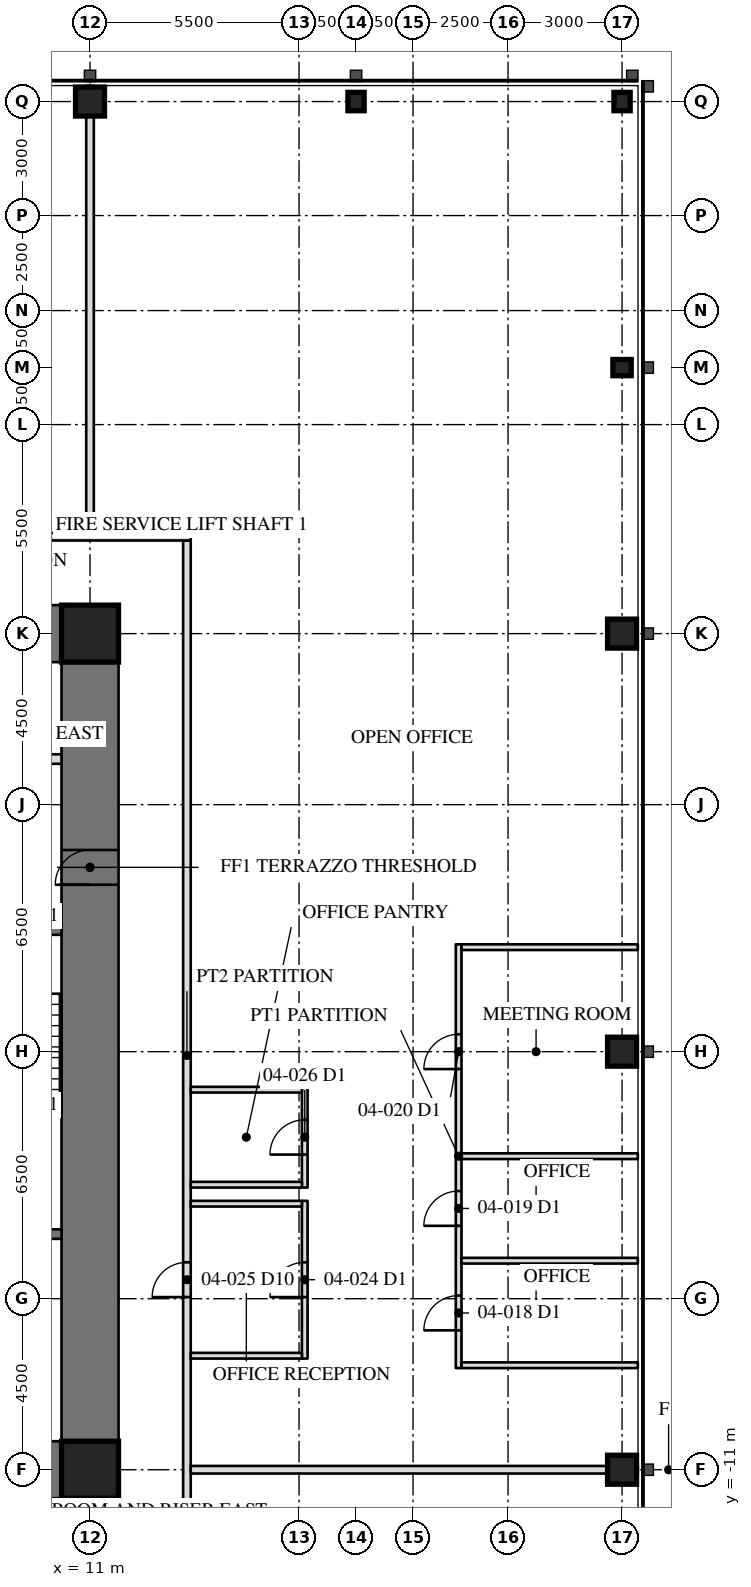
"""IFC4 building model, lengths in metres.
Left out: names, types, materials, properties, quantities, classifications, styles, units other than length and angle.
Written with IfcOpenShell. Run it as: python <this file> out.ifc"""

import sys

from ifc_helpers import new_model, si_unit, direction, frame, frame_2d, origin, origin_2d, place, context, subcontext, project, spatial, rectangle, hollow_rectangle, i_section, extrude, element, fill, save


model = new_model("IFC4")
c1 = context("Model", 3, precision=1e-05, world=origin(), true_north=direction((0.0, 1.0)))
c2 = subcontext(c1, "Body", "Model", "MODEL_VIEW")
j1 = project(units=[si_unit("LENGTHUNIT", "METRE"), si_unit("PLANEANGLEUNIT", "RADIAN")], contexts=[c1])
p1 = place(None, origin())
s1 = spatial("IfcSite", under=j1, at=p1, CompositionType="ELEMENT")
p2 = place(p1, origin())
s2 = spatial("IfcBuilding", under=s1, at=p2, CompositionType="ELEMENT")
p3 = place(p2, frame((0.0, 0.0, 20.1)))
s3 = spatial("IfcBuildingStorey", under=s2, at=p3, CompositionType="ELEMENT", Elevation=20.1)
for number, where, z_axis, x_axis in (
    (1, (25.0, -11.0, 0.0), (0.0, 0.0, 1.0), (0.0, 1.0, 0.0)),
    (2, (25.0, 0.0, 0.0), (0.0, 0.0, 1.0), (0.0, 1.0, 0.0)),
    (3, (25.0, 11.0, 0.0), (0.0, 0.0, 1.0), (0.0, 1.0, 0.0)),
):
    element("IfcColumn", number, at=place(p3, frame(where, z_axis=z_axis, x_axis=x_axis)), inside=s3, PredefinedType="COLUMN", context=c2, shape_type="SweptSolid", body=[
        extrude(hollow_rectangle(XDim=0.762, YDim=0.762, WallThickness=0.152, at=origin_2d()), origin(), (0.0, 0.0, 1.0), 4.1),
    ])
for number, where, z_axis, x_axis in (
    (4, (25.0, 18.0, 0.0), (0.0, 0.0, 1.0), (0.0, 1.0, 0.0)),
    (5, (25.0, 25.0, 0.0), (0.0, 0.0, 1.0), (1.0, 0.0, 0.0)),
    (6, (18.0, 25.0, 0.0), (0.0, 0.0, 1.0), (1.0, 0.0, 0.0)),
):
    element("IfcColumn", number, at=place(p3, frame(where, z_axis=z_axis, x_axis=x_axis)), inside=s3, PredefinedType="COLUMN", context=c2, shape_type="SweptSolid", body=[
        extrude(i_section(OverallWidth=0.427, OverallDepth=0.483, WebThickness=0.051, FlangeThickness=0.082, at=origin_2d()), origin(), (0.0, 0.0, 1.0), 4.1),
    ])
p4 = place(p3, frame((11.0, 25.0, 0.0), z_axis=(0.0, 0.0, 1.0), x_axis=(1.0, 0.0, 0.0)))
e7 = element("IfcColumn", 7, at=p4, inside=s3, PredefinedType="COLUMN", context=c2, shape_type="SweptSolid", body=[
    extrude(hollow_rectangle(XDim=0.762, YDim=0.762, WallThickness=0.152, at=origin_2d()), origin(), (0.0, 0.0, 1.0), 4.1),
])
p5 = place(p3, frame((11.0, -11.0, 0.0), z_axis=(0.0, 0.0, 1.0), x_axis=(0.0, 1.0, 0.0)))
e8 = element("IfcWall", 8, at=p5, inside=s3, PredefinedType="SHEAR", context=c2, shape_type="SweptSolid", body=[
    extrude(rectangle(XDim=22.0, YDim=1.5, at=frame_2d((11.0, 0.0))), origin(), (0.0, 0.0, 1.0), 4.1),
])
p6 = place(p5, frame((15.393, 0.0, 0.0)))
e9 = element("IfcOpeningElement", 9, at=p6, cuts=e8, PredefinedType="OPENING", context=c2, shape_type="SweptSolid", body=[
    extrude(rectangle(XDim=0.915, YDim=2.134, at=frame_2d((0.458, 1.067))), frame((0.0, 0.76, 0.0), z_axis=(0.0, -1.0, 0.0), x_axis=(1.0, 0.0, 0.0)), (0.0, 0.0, 1.0), 1.52),
])
for number, where, z_axis, x_axis in (
    (10, (11.0, 11.0, 0.0), (0.0, 0.0, 1.0), (-1.0, 0.0, 0.0)),
    (11, (6.5, -11.0, 0.0), (0.0, 0.0, 1.0), (1.0, 0.0, 0.0)),
):
    element("IfcWall", number, at=place(p3, frame(where, z_axis=z_axis, x_axis=x_axis)), inside=s3, PredefinedType="SHEAR", context=c2, shape_type="SweptSolid", body=[
        extrude(rectangle(XDim=4.5, YDim=1.5, at=frame_2d((2.25, 0.0))), origin(), (0.0, 0.0, 1.0), 4.1),
    ])
for number, where, z_axis, x_axis in (
    (12, (11.0, 11.0, 0.0), (0.0, 0.0, 1.0), (1.0, 0.0, 0.0)),
    (13, (11.0, -11.0, 0.0), (0.0, 0.0, 1.0), (1.0, 0.0, 0.0)),
):
    element("IfcColumn", number, at=place(p3, frame(where, z_axis=z_axis, x_axis=x_axis)), inside=s3, PredefinedType="COLUMN", context=c2, shape_type="SweptSolid", body=[
        extrude(hollow_rectangle(XDim=1.499, YDim=1.499, WallThickness=0.102, at=origin_2d()), origin(), (0.0, 0.0, 1.0), 4.1),
    ])
p7 = place(p3, frame((6.95, -4.8, 0.0), z_axis=(0.0, 0.0, 1.0), x_axis=(1.0, 0.0, 0.0)))
e14 = element("IfcWall", 14, at=p7, inside=s3, PredefinedType="SOLIDWALL", context=c2, shape_type="SweptSolid", body=[
    extrude(rectangle(XDim=3.3, YDim=0.25, at=frame_2d((1.65, 0.0))), origin(), (0.0, 0.0, 1.0), 3.91),
])
p8 = place(p3, frame((6.95, 3.2, 0.0), z_axis=(0.0, 0.0, 1.0), x_axis=(1.0, 0.0, 0.0)))
e15 = element("IfcWall", 15, at=p8, inside=s3, PredefinedType="SOLIDWALL", context=c2, shape_type="SweptSolid", body=[
    extrude(rectangle(XDim=3.3, YDim=0.25, at=frame_2d((1.65, 0.0))), origin(), (0.0, 0.0, 1.0), 3.91),
])
p9 = place(p8, frame((1.116, 0.0, 0.0)))
e16 = element("IfcOpeningElement", 16, at=p9, cuts=e15, PredefinedType="OPENING", context=c2, shape_type="SweptSolid", body=[
    extrude(rectangle(XDim=1.067, YDim=2.134, at=frame_2d((0.533, 1.067))), frame((0.0, 0.135, 0.0), z_axis=(0.0, -1.0, 0.0), x_axis=(1.0, 0.0, 0.0)), (0.0, 0.0, 1.0), 0.27),
])
p10 = place(p3, frame((6.95, 7.7, 0.0), z_axis=(0.0, 0.0, 1.0), x_axis=(1.0, 0.0, 0.0)))
e17 = element("IfcWall", 17, at=p10, inside=s3, PredefinedType="PARTITIONING", context=c2, shape_type="SweptSolid", body=[
    extrude(rectangle(XDim=3.3, YDim=0.25, at=frame_2d((1.65, 0.0))), origin(), (0.0, 0.0, 1.0), 3.91),
])
p11 = place(p10, frame((0.45, 0.0, 0.0)))
e18 = element("IfcOpeningElement", 18, at=p11, cuts=e17, PredefinedType="OPENING", context=c2, shape_type="SweptSolid", body=[
    extrude(rectangle(XDim=1.219, YDim=2.134, at=frame_2d((0.609, 1.067))), frame((0.0, 0.135, 0.0), z_axis=(0.0, -1.0, 0.0), x_axis=(1.0, 0.0, 0.0)), (0.0, 0.0, 1.0), 0.27),
])
p12 = place(p3, frame((13.55, -13.65, 0.0), z_axis=(0.0, 0.0, 1.0), x_axis=(0.0, 1.0, 0.0)))
e19 = element("IfcWall", 19, at=p12, inside=s3, PredefinedType="PARTITIONING", context=c2, shape_type="SweptSolid", body=[
    extrude(rectangle(XDim=27.1, YDim=0.2, at=frame_2d((13.55, 0.0))), origin(), (0.0, 0.0, 1.0), 3.91),
])
p13 = place(p12, frame((7.192, 0.0, 0.0)))
e20 = element("IfcOpeningElement", 20, at=p13, cuts=e19, PredefinedType="OPENING", context=c2, shape_type="SweptSolid", body=[
    extrude(rectangle(XDim=0.915, YDim=2.134, at=frame_2d((0.458, 1.067))), frame((0.0, 0.11, 0.0), z_axis=(0.0, -1.0, 0.0), x_axis=(1.0, 0.0, 0.0)), (0.0, 0.0, 1.0), 0.22),
])
p14 = place(p3, frame((13.65, 13.55, 0.0), z_axis=(0.0, 0.0, 1.0), x_axis=(-1.0, 0.0, 0.0)))
e21 = element("IfcWall", 21, at=p14, inside=s3, PredefinedType="PARTITIONING", context=c2, shape_type="SweptSolid", body=[
    extrude(rectangle(XDim=27.1, YDim=0.2, at=frame_2d((13.55, 0.0))), origin(), (0.0, 0.0, 1.0), 3.91),
])
p15 = place(p14, frame((9.192, 0.0, 0.0)))
e22 = element("IfcOpeningElement", 22, at=p15, cuts=e21, PredefinedType="OPENING", context=c2, shape_type="SweptSolid", body=[
    extrude(rectangle(XDim=0.915, YDim=2.134, at=frame_2d((0.458, 1.067))), frame((0.0, 0.11, 0.0), z_axis=(0.0, -1.0, 0.0), x_axis=(1.0, 0.0, 0.0)), (0.0, 0.0, 1.0), 0.22),
])
for number, where, z_axis, x_axis in (
    (23, (11.0, 13.65, 0.0), (0.0, 0.0, 1.0), (0.0, 1.0, 0.0)),
    (24, (13.65, -11.0, 0.0), (0.0, 0.0, 1.0), (1.0, 0.0, 0.0)),
):
    element("IfcWall", number, at=place(p3, frame(where, z_axis=z_axis, x_axis=x_axis)), inside=s3, PredefinedType="PARTITIONING", context=c2, shape_type="SweptSolid", body=[
        extrude(rectangle(XDim=11.765, YDim=0.2, at=frame_2d((5.883, 0.0))), origin(), (0.0, 0.0, 1.0), 3.13),
    ])
p16 = place(p3, frame((20.7, -8.325, 0.0), z_axis=(0.0, 0.0, 1.0), x_axis=(0.0, 1.0, 0.0)))
e25 = element("IfcWall", 25, at=p16, inside=s3, PredefinedType="PARTITIONING", context=c2, shape_type="SweptSolid", body=[
    extrude(rectangle(XDim=11.15, YDim=0.15, at=frame_2d((5.575, 0.0))), origin(), (0.0, 0.0, 1.0), 3.91),
])
p17 = place(p16, frame((0.992, 0.0, 0.0)))
e26 = element("IfcOpeningElement", 26, at=p17, cuts=e25, PredefinedType="OPENING", context=c2, shape_type="SweptSolid", body=[
    extrude(rectangle(XDim=0.915, YDim=2.134, at=frame_2d((0.458, 1.067))), frame((0.0, 0.085, 0.0), z_axis=(0.0, -1.0, 0.0), x_axis=(1.0, 0.0, 0.0)), (0.0, 0.0, 1.0), 0.17),
])
p18 = place(p16, frame((3.742, 0.0, 0.0)))
e27 = element("IfcOpeningElement", 27, at=p18, cuts=e25, PredefinedType="OPENING", context=c2, shape_type="SweptSolid", body=[
    extrude(rectangle(XDim=0.915, YDim=2.134, at=frame_2d((0.458, 1.067))), frame((0.0, 0.085, 0.0), z_axis=(0.0, -1.0, 0.0), x_axis=(1.0, 0.0, 0.0)), (0.0, 0.0, 1.0), 0.17),
])
p19 = place(p16, frame((7.867, 0.0, 0.0)))
e28 = element("IfcOpeningElement", 28, at=p19, cuts=e25, PredefinedType="OPENING", context=c2, shape_type="SweptSolid", body=[
    extrude(rectangle(XDim=0.915, YDim=2.134, at=frame_2d((0.458, 1.067))), frame((0.0, 0.085, 0.0), z_axis=(0.0, -1.0, 0.0), x_axis=(1.0, 0.0, 0.0)), (0.0, 0.0, 1.0), 0.17),
])
for number, where, z_axis, x_axis in (
    (29, (20.775, -8.25, 0.0), (0.0, 0.0, 1.0), (1.0, 0.0, 0.0)),
    (30, (20.775, -5.5, 0.0), (0.0, 0.0, 1.0), (1.0, 0.0, 0.0)),
    (31, (20.775, -2.75, 0.0), (0.0, 0.0, 1.0), (1.0, 0.0, 0.0)),
    (32, (20.775, 2.75, 0.0), (0.0, 0.0, 1.0), (1.0, 0.0, 0.0)),
):
    element("IfcWall", number, at=place(p3, frame(where, z_axis=z_axis, x_axis=x_axis)), inside=s3, PredefinedType="PARTITIONING", context=c2, shape_type="SweptSolid", body=[
        extrude(rectangle(XDim=4.64, YDim=0.15, at=frame_2d((2.32, 0.0))), origin(), (0.0, 0.0, 1.0), 3.91),
    ])
p20 = place(p3, frame((16.65, -8.075, 0.0), z_axis=(0.0, 0.0, 1.0), x_axis=(0.0, 1.0, 0.0)))
e33 = element("IfcWall", 33, at=p20, inside=s3, PredefinedType="PARTITIONING", context=c2, shape_type="SweptSolid", body=[
    extrude(rectangle(XDim=4.15, YDim=0.15, at=frame_2d((2.075, 0.0))), origin(), (0.0, 0.0, 1.0), 3.91),
])
p21 = place(p20, frame((1.617, 0.0, 0.0)))
e34 = element("IfcOpeningElement", 34, at=p21, cuts=e33, PredefinedType="OPENING", context=c2, shape_type="SweptSolid", body=[
    extrude(rectangle(XDim=0.915, YDim=2.134, at=frame_2d((0.458, 1.067))), frame((0.0, 0.085, 0.0), z_axis=(0.0, -1.0, 0.0), x_axis=(1.0, 0.0, 0.0)), (0.0, 0.0, 1.0), 0.17),
])
for number, where, z_axis, x_axis in (
    (35, (16.575, -8.0, 0.0), (0.0, 0.0, 1.0), (-1.0, 0.0, 0.0)),
    (36, (16.575, -4.0, 0.0), (0.0, 0.0, 1.0), (-1.0, 0.0, 0.0)),
):
    element("IfcWall", number, at=place(p3, frame(where, z_axis=z_axis, x_axis=x_axis)), inside=s3, PredefinedType="PARTITIONING", context=c2, shape_type="SweptSolid", body=[
        extrude(rectangle(XDim=2.925, YDim=0.15, at=frame_2d((1.462, 0.0))), origin(), (0.0, 0.0, 1.0), 3.91),
    ])
p22 = place(p3, frame((16.65, -3.575, 0.0), z_axis=(0.0, 0.0, 1.0), x_axis=(0.0, 1.0, 0.0)))
e37 = element("IfcWall", 37, at=p22, inside=s3, PredefinedType="PARTITIONING", context=c2, shape_type="SweptSolid", body=[
    extrude(rectangle(XDim=2.65, YDim=0.15, at=frame_2d((1.325, 0.0))), origin(), (0.0, 0.0, 1.0), 3.91),
])
p23 = place(p22, frame((0.867, 0.0, 0.0)))
e38 = element("IfcOpeningElement", 38, at=p23, cuts=e37, PredefinedType="OPENING", context=c2, shape_type="SweptSolid", body=[
    extrude(rectangle(XDim=0.915, YDim=2.134, at=frame_2d((0.458, 1.067))), frame((0.0, 0.085, 0.0), z_axis=(0.0, -1.0, 0.0), x_axis=(1.0, 0.0, 0.0)), (0.0, 0.0, 1.0), 0.17),
])
for number, where, z_axis, x_axis in (
    (39, (16.575, -3.5, 0.0), (0.0, 0.0, 1.0), (-1.0, 0.0, 0.0)),
    (40, (16.575, -1.0, 0.0), (0.0, 0.0, 1.0), (-1.0, 0.0, 0.0)),
):
    element("IfcWall", number, at=place(p3, frame(where, z_axis=z_axis, x_axis=x_axis)), inside=s3, PredefinedType="PARTITIONING", context=c2, shape_type="SweptSolid", body=[
        extrude(rectangle(XDim=2.925, YDim=0.15, at=frame_2d((1.462, 0.0))), origin(), (0.0, 0.0, 1.0), 3.91),
    ])
p24 = place(p6, origin())
e41 = element("IfcDoor", 41, at=p24, inside=s3, OperationType="SINGLE_SWING_RIGHT", PredefinedType="DOOR", context=c2, shape_type="SweptSolid", body=[
    extrude(rectangle(XDim=0.915, YDim=2.134, at=frame_2d((0.458, 1.067))), frame((0.0, -0.675, 0.0), z_axis=(0.0, -1.0, 0.0), x_axis=(1.0, 0.0, 0.0)), (0.0, 0.0, 1.0), 0.05),
])
fill(e9, e41)
p25 = place(p17, origin())
e42 = element("IfcDoor", 42, at=p25, inside=s3, OperationType="SINGLE_SWING_LEFT", PredefinedType="DOOR", context=c2, shape_type="SweptSolid", body=[
    extrude(rectangle(XDim=0.915, YDim=2.134, at=frame_2d((0.458, 1.067))), frame((0.0, 0.025, 0.0), z_axis=(0.0, -1.0, 0.0), x_axis=(1.0, 0.0, 0.0)), (0.0, 0.0, 1.0), 0.05),
])
fill(e26, e42)
p26 = place(p18, origin())
e43 = element("IfcDoor", 43, at=p26, inside=s3, OperationType="SINGLE_SWING_LEFT", PredefinedType="DOOR", context=c2, shape_type="SweptSolid", body=[
    extrude(rectangle(XDim=0.915, YDim=2.134, at=frame_2d((0.458, 1.067))), frame((0.0, 0.025, 0.0), z_axis=(0.0, -1.0, 0.0), x_axis=(1.0, 0.0, 0.0)), (0.0, 0.0, 1.0), 0.05),
])
fill(e27, e43)
p27 = place(p19, origin())
e44 = element("IfcDoor", 44, at=p27, inside=s3, OperationType="SINGLE_SWING_LEFT", PredefinedType="DOOR", context=c2, shape_type="SweptSolid", body=[
    extrude(rectangle(XDim=0.915, YDim=2.134, at=frame_2d((0.458, 1.067))), frame((0.0, 0.025, 0.0), z_axis=(0.0, -1.0, 0.0), x_axis=(1.0, 0.0, 0.0)), (0.0, 0.0, 1.0), 0.05),
])
fill(e28, e44)
p28 = place(p21, origin())
e45 = element("IfcDoor", 45, at=p28, inside=s3, OperationType="SINGLE_SWING_LEFT", PredefinedType="DOOR", context=c2, shape_type="SweptSolid", body=[
    extrude(rectangle(XDim=0.915, YDim=2.134, at=frame_2d((0.458, 1.067))), frame((0.0, 0.025, 0.0), z_axis=(0.0, -1.0, 0.0), x_axis=(1.0, 0.0, 0.0)), (0.0, 0.0, 1.0), 0.05),
])
fill(e34, e45)
p29 = place(p13, origin())
e46 = element("IfcDoor", 46, at=p29, inside=s3, OperationType="SINGLE_SWING_LEFT", PredefinedType="DOOR", context=c2, shape_type="SweptSolid", body=[
    extrude(rectangle(XDim=0.915, YDim=2.134, at=frame_2d((0.458, 1.067))), frame((0.0, 0.025, 0.0), z_axis=(0.0, -1.0, 0.0), x_axis=(1.0, 0.0, 0.0)), (0.0, 0.0, 1.0), 0.05),
])
fill(e20, e46)
p30 = place(p23, origin())
e47 = element("IfcDoor", 47, at=p30, inside=s3, OperationType="SINGLE_SWING_LEFT", PredefinedType="DOOR", context=c2, shape_type="SweptSolid", body=[
    extrude(rectangle(XDim=0.915, YDim=2.134, at=frame_2d((0.458, 1.067))), frame((0.0, 0.025, 0.0), z_axis=(0.0, -1.0, 0.0), x_axis=(1.0, 0.0, 0.0)), (0.0, 0.0, 1.0), 0.05),
])
fill(e38, e47)
save(model, sys.argv[1])
